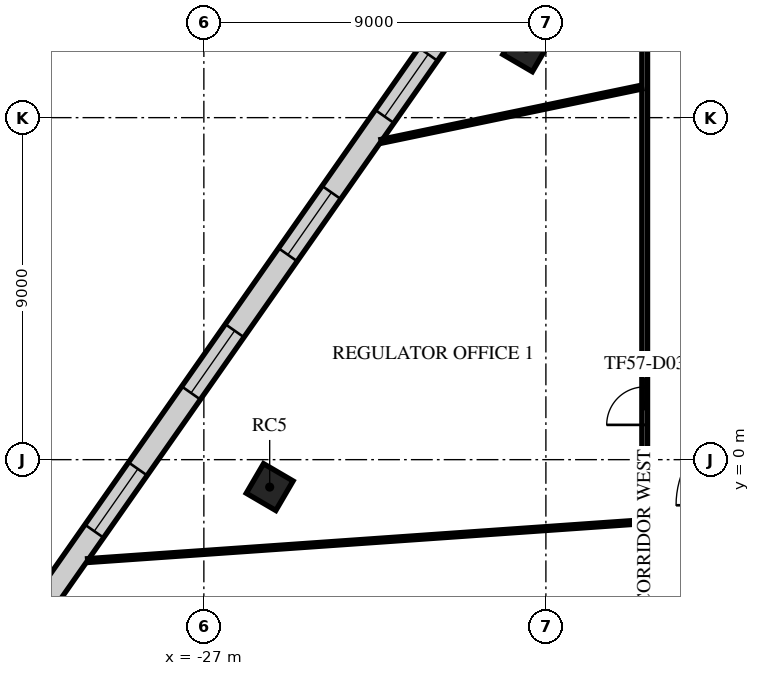
"""IFC4 building model, lengths in metres.
Left out: names, types, materials, properties, quantities, classifications, styles, units other than length and angle.
Written with IfcOpenShell. Run it as: python <this file> out.ifc"""

import sys

from ifc_helpers import new_model, si_unit, direction, frame, frame_2d, origin, origin_2d, place, context, subcontext, project, spatial, rectangle, extrude, element, fill, save


model = new_model("IFC4")
c1 = context("Model", 3, precision=1e-05, world=origin(), true_north=direction((0.0, 1.0)))
c2 = subcontext(c1, "Body", "Model", "MODEL_VIEW")
j1 = project(units=[si_unit("LENGTHUNIT", "METRE"), si_unit("PLANEANGLEUNIT", "RADIAN")], contexts=[c1])
p1 = place(None, origin())
s1 = spatial("IfcSite", under=j1, at=p1, CompositionType="ELEMENT")
p2 = place(p1, origin())
s2 = spatial("IfcBuilding", under=s1, at=p2, CompositionType="ELEMENT")
p3 = place(p2, frame((0.0, 0.0, 246.9)))
s3 = spatial("IfcBuildingStorey", under=s2, at=p3, CompositionType="ELEMENT", Elevation=246.9)
for number, where, z_axis, x_axis in (
    (1, (-18.518, 10.825, 0.0), (0.0, 0.0, 1.0), (0.505, 0.863, 0.0)),
    (2, (-25.268, -0.722, 0.0), (0.0, 0.0, 1.0), (0.505, 0.863, 0.0)),
):
    element("IfcColumn", number, at=place(p3, frame(where, z_axis=z_axis, x_axis=x_axis)), inside=s3, PredefinedType="COLUMN", context=c2, shape_type="SweptSolid", body=[
        extrude(rectangle(XDim=0.9, YDim=0.9, at=origin_2d()), origin(), (0.0, 0.0, 1.0), 4.0),
    ])
p4 = place(p3, frame((-5.115, 33.491, 0.0), z_axis=(0.0, 0.0, 1.0), x_axis=(-0.57357740375, -0.819151366908, 0.0)))
e3 = element("IfcWall", 3, at=p4, inside=s3, PredefinedType="STANDARD", context=c2, shape_type="SweptSolid", body=[
    extrude(rectangle(XDim=48.843, YDim=0.6, at=frame_2d((24.422, 0.0))), origin(), (0.0, 0.0, 1.0), 3.64),
])
p5 = place(p4, frame((1.22, 0.0, 0.9)))
e4 = element("IfcOpeningElement", 4, at=p5, cuts=e3, PredefinedType="OPENING", context=c2, shape_type="SweptSolid", body=[
    extrude(rectangle(XDim=2.0, YDim=2.1, at=frame_2d((1.0, 1.05))), frame((0.0, 0.31, 0.0), z_axis=(0.0, -1.0, 0.0), x_axis=(1.0, 0.0, 0.0)), (0.0, 0.0, 1.0), 0.62),
])
p6 = place(p4, frame((5.66, 0.0, 0.9)))
e5 = element("IfcOpeningElement", 5, at=p6, cuts=e3, PredefinedType="OPENING", context=c2, shape_type="SweptSolid", body=[
    extrude(rectangle(XDim=2.0, YDim=2.1, at=frame_2d((1.0, 1.05))), frame((0.0, 0.31, 0.0), z_axis=(0.0, -1.0, 0.0), x_axis=(1.0, 0.0, 0.0)), (0.0, 0.0, 1.0), 0.62),
])
p7 = place(p4, frame((10.101, 0.0, 0.9)))
e6 = element("IfcOpeningElement", 6, at=p7, cuts=e3, PredefinedType="OPENING", context=c2, shape_type="SweptSolid", body=[
    extrude(rectangle(XDim=2.0, YDim=2.1, at=frame_2d((1.0, 1.05))), frame((0.0, 0.31, 0.0), z_axis=(0.0, -1.0, 0.0), x_axis=(1.0, 0.0, 0.0)), (0.0, 0.0, 1.0), 0.62),
])
p8 = place(p4, frame((14.541, 0.0, 0.9)))
e7 = element("IfcOpeningElement", 7, at=p8, cuts=e3, PredefinedType="OPENING", context=c2, shape_type="SweptSolid", body=[
    extrude(rectangle(XDim=2.0, YDim=2.1, at=frame_2d((1.0, 1.05))), frame((0.0, 0.31, 0.0), z_axis=(0.0, -1.0, 0.0), x_axis=(1.0, 0.0, 0.0)), (0.0, 0.0, 1.0), 0.62),
])
p9 = place(p4, frame((18.981, 0.0, 0.9)))
e8 = element("IfcOpeningElement", 8, at=p9, cuts=e3, PredefinedType="OPENING", context=c2, shape_type="SweptSolid", body=[
    extrude(rectangle(XDim=2.0, YDim=2.1, at=frame_2d((1.0, 1.05))), frame((0.0, 0.31, 0.0), z_axis=(0.0, -1.0, 0.0), x_axis=(1.0, 0.0, 0.0)), (0.0, 0.0, 1.0), 0.62),
])
p10 = place(p4, frame((23.422, 0.0, 0.9)))
e9 = element("IfcOpeningElement", 9, at=p10, cuts=e3, PredefinedType="OPENING", context=c2, shape_type="SweptSolid", body=[
    extrude(rectangle(XDim=2.0, YDim=2.1, at=frame_2d((1.0, 1.05))), frame((0.0, 0.31, 0.0), z_axis=(0.0, -1.0, 0.0), x_axis=(1.0, 0.0, 0.0)), (0.0, 0.0, 1.0), 0.62),
])
p11 = place(p4, frame((27.862, 0.0, 0.9)))
e10 = element("IfcOpeningElement", 10, at=p11, cuts=e3, PredefinedType="OPENING", context=c2, shape_type="SweptSolid", body=[
    extrude(rectangle(XDim=2.0, YDim=2.1, at=frame_2d((1.0, 1.05))), frame((0.0, 0.31, 0.0), z_axis=(0.0, -1.0, 0.0), x_axis=(1.0, 0.0, 0.0)), (0.0, 0.0, 1.0), 0.62),
])
p12 = place(p4, frame((32.302, 0.0, 0.9)))
e11 = element("IfcOpeningElement", 11, at=p12, cuts=e3, PredefinedType="OPENING", context=c2, shape_type="SweptSolid", body=[
    extrude(rectangle(XDim=2.0, YDim=2.1, at=frame_2d((1.0, 1.05))), frame((0.0, 0.31, 0.0), z_axis=(0.0, -1.0, 0.0), x_axis=(1.0, 0.0, 0.0)), (0.0, 0.0, 1.0), 0.62),
])
p13 = place(p4, frame((36.742, 0.0, 0.9)))
e12 = element("IfcOpeningElement", 12, at=p13, cuts=e3, PredefinedType="OPENING", context=c2, shape_type="SweptSolid", body=[
    extrude(rectangle(XDim=2.0, YDim=2.1, at=frame_2d((1.0, 1.05))), frame((0.0, 0.31, 0.0), z_axis=(0.0, -1.0, 0.0), x_axis=(1.0, 0.0, 0.0)), (0.0, 0.0, 1.0), 0.62),
])
p14 = place(p4, frame((41.183, 0.0, 0.9)))
e13 = element("IfcOpeningElement", 13, at=p14, cuts=e3, PredefinedType="OPENING", context=c2, shape_type="SweptSolid", body=[
    extrude(rectangle(XDim=2.0, YDim=2.1, at=frame_2d((1.0, 1.05))), frame((0.0, 0.31, 0.0), z_axis=(0.0, -1.0, 0.0), x_axis=(1.0, 0.0, 0.0)), (0.0, 0.0, 1.0), 0.62),
])
p15 = place(p4, frame((45.623, 0.0, 0.9)))
e14 = element("IfcOpeningElement", 14, at=p15, cuts=e3, PredefinedType="OPENING", context=c2, shape_type="SweptSolid", body=[
    extrude(rectangle(XDim=2.0, YDim=2.1, at=frame_2d((1.0, 1.05))), frame((0.0, 0.31, 0.0), z_axis=(0.0, -1.0, 0.0), x_axis=(1.0, 0.0, 0.0)), (0.0, 0.0, 1.0), 0.62),
])
p16 = place(p3, frame((-15.4, -12.046, 0.0), z_axis=(0.0, 0.0, 1.0), x_axis=(0.0, 1.0, 0.0)))
e15 = element("IfcWall", 15, at=p16, inside=s3, PredefinedType="PARTITIONING", context=c2, shape_type="SweptSolid", body=[
    extrude(rectangle(XDim=27.446, YDim=0.15, at=frame_2d((13.723, 0.0))), origin(), (0.0, 0.0, 1.0), 3.24),
])
p17 = place(p16, frame((12.961, 0.0, 0.0)))
e16 = element("IfcOpeningElement", 16, at=p17, cuts=e15, PredefinedType="OPENING", context=c2, shape_type="SweptSolid", body=[
    extrude(rectangle(XDim=1.0, YDim=2.1, at=frame_2d((0.5, 1.05))), frame((0.0, 0.085, 0.0), z_axis=(0.0, -1.0, 0.0), x_axis=(1.0, 0.0, 0.0)), (0.0, 0.0, 1.0), 0.17),
])
p18 = place(p3, frame((-30.057, -2.656, 0.0), z_axis=(0.0, 0.0, 1.0), x_axis=(0.99756824466, 0.069696465096, 0.0)))
e17 = element("IfcWall", 17, at=p18, inside=s3, PredefinedType="PARTITIONING", context=c2, shape_type="SweptSolid", body=[
    extrude(rectangle(XDim=14.614, YDim=0.1, at=frame_2d((7.307, 0.0))), origin(), (0.0, 0.0, 1.0), 3.64),
])
p19 = place(p3, frame((-22.331, 8.378, 0.0), z_axis=(0.0, 0.0, 1.0), x_axis=(0.97903673151, 0.203683770474, 0.0)))
e18 = element("IfcWall", 18, at=p19, inside=s3, PredefinedType="PARTITIONING", context=c2, shape_type="SweptSolid", body=[
    extrude(rectangle(XDim=6.993, YDim=0.1, at=frame_2d((3.496, 0.0))), origin(), (0.0, 0.0, 1.0), 3.64),
])
p20 = place(p11, origin())
e19 = element("IfcWindow", 19, at=p20, inside=s3, PartitioningType="SINGLE_PANEL", PredefinedType="WINDOW", context=c2, shape_type="SweptSolid", body=[
    extrude(rectangle(XDim=2.0, YDim=2.1, at=frame_2d((1.0, 1.05))), frame((0.0, 0.03, 0.0), z_axis=(0.0, -1.0, 0.0), x_axis=(1.0, 0.0, 0.0)), (0.0, 0.0, 1.0), 0.06),
])
fill(e10, e19)
p21 = place(p12, origin())
e20 = element("IfcWindow", 20, at=p21, inside=s3, PartitioningType="SINGLE_PANEL", PredefinedType="WINDOW", context=c2, shape_type="SweptSolid", body=[
    extrude(rectangle(XDim=2.0, YDim=2.1, at=frame_2d((1.0, 1.05))), frame((0.0, 0.03, 0.0), z_axis=(0.0, -1.0, 0.0), x_axis=(1.0, 0.0, 0.0)), (0.0, 0.0, 1.0), 0.06),
])
fill(e11, e20)
p22 = place(p13, origin())
e21 = element("IfcWindow", 21, at=p22, inside=s3, PartitioningType="SINGLE_PANEL", PredefinedType="WINDOW", context=c2, shape_type="SweptSolid", body=[
    extrude(rectangle(XDim=2.0, YDim=2.1, at=frame_2d((1.0, 1.05))), frame((0.0, 0.03, 0.0), z_axis=(0.0, -1.0, 0.0), x_axis=(1.0, 0.0, 0.0)), (0.0, 0.0, 1.0), 0.06),
])
fill(e12, e21)
p23 = place(p14, origin())
e22 = element("IfcWindow", 22, at=p23, inside=s3, PartitioningType="SINGLE_PANEL", PredefinedType="WINDOW", context=c2, shape_type="SweptSolid", body=[
    extrude(rectangle(XDim=2.0, YDim=2.1, at=frame_2d((1.0, 1.05))), frame((0.0, 0.03, 0.0), z_axis=(0.0, -1.0, 0.0), x_axis=(1.0, 0.0, 0.0)), (0.0, 0.0, 1.0), 0.06),
])
fill(e13, e22)
p24 = place(p17, origin())
e23 = element("IfcDoor", 23, at=p24, inside=s3, OperationType="SINGLE_SWING_LEFT", PredefinedType="DOOR", context=c2, shape_type="SweptSolid", body=[
    extrude(rectangle(XDim=1.0, YDim=2.1, at=frame_2d((0.5, 1.05))), frame((0.0, 0.025, 0.0), z_axis=(0.0, -1.0, 0.0), x_axis=(1.0, 0.0, 0.0)), (0.0, 0.0, 1.0), 0.05),
])
fill(e16, e23)
save(model, sys.argv[1])
